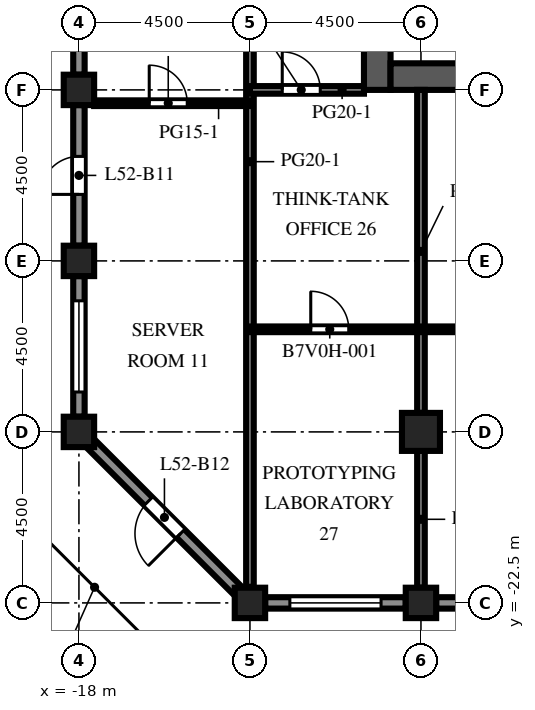
"""IFC4 building model, lengths in metres.
Left out: names, types, materials, properties, quantities, classifications, styles, units other than length and angle.
Written with IfcOpenShell. Run it as: python <this file> out.ifc"""

import sys

from ifc_helpers import new_model, si_unit, direction, frame, frame_2d, origin, origin_2d, place, context, subcontext, project, spatial, rectangle, extrude, element, fill, save


model = new_model("IFC4")
c1 = context("Model", 3, precision=1e-05, world=origin(), true_north=direction((0.0, 1.0)))
c2 = subcontext(c1, "Body", "Model", "MODEL_VIEW")
j1 = project(units=[si_unit("LENGTHUNIT", "METRE"), si_unit("PLANEANGLEUNIT", "RADIAN")], contexts=[c1])
p1 = place(None, origin())
s1 = spatial("IfcSite", under=j1, at=p1, CompositionType="ELEMENT")
p2 = place(p1, origin())
s2 = spatial("IfcBuilding", under=s1, at=p2, CompositionType="ELEMENT")
p3 = place(p2, frame((0.0, 0.0, 231.6)))
s3 = spatial("IfcBuildingStorey", under=s2, at=p3, CompositionType="ELEMENT", Elevation=231.6)
for number, where, z_axis, x_axis in (
    (1, (-18.0, -18.0, 0.0), (0.0, 0.0, 1.0), (1.0, 0.0, 0.0)),
    (2, (-18.0, -13.5, 0.0), (0.0, 0.0, 1.0), (1.0, 0.0, 0.0)),
    (3, (-18.0, -9.0, 0.0), (0.0, 0.0, 1.0), (1.0, 0.0, 0.0)),
    (4, (-13.5, -22.5, 0.0), (0.0, 0.0, 1.0), (1.0, 0.0, 0.0)),
    (5, (-9.0, -22.5, 0.0), (0.0, 0.0, 1.0), (1.0, 0.0, 0.0)),
):
    element("IfcColumn", number, at=place(p3, frame(where, z_axis=z_axis, x_axis=x_axis)), inside=s3, PredefinedType="COLUMN", context=c2, shape_type="SweptSolid", body=[
        extrude(rectangle(XDim=0.8, YDim=0.8, at=origin_2d()), origin(), (0.0, 0.0, 1.0), 4.1),
    ])
p4 = place(p3, frame((-9.0, -18.0, 0.0), z_axis=(0.0, 0.0, 1.0), x_axis=(1.0, 0.0, 0.0)))
e6 = element("IfcColumn", 6, at=p4, inside=s3, PredefinedType="COLUMN", context=c2, shape_type="SweptSolid", body=[
    extrude(rectangle(XDim=1.0, YDim=1.0, at=origin_2d()), origin(), (0.0, 0.0, 1.0), 4.1),
])
p5 = place(p3, frame((-10.15, -9.0, 0.0), z_axis=(0.0, 0.0, 1.0), x_axis=(0.0, 1.0, 0.0)))
e7 = element("IfcWall", 7, at=p5, inside=s3, PredefinedType="SHEAR", context=c2, shape_type="SweptSolid", body=[
    extrude(rectangle(XDim=27.5, YDim=0.7, at=frame_2d((13.75, 0.0))), origin(), (0.0, 0.0, 1.0), 4.1),
])
p6 = place(p5, frame((12.55, 0.0, 0.0)))
e8 = element("IfcOpeningElement", 8, at=p6, cuts=e7, PredefinedType="OPENING", context=c2, shape_type="SweptSolid", body=[
    extrude(rectangle(XDim=2.4, YDim=2.4, at=frame_2d((1.2, 1.2))), frame((0.0, 0.36, 0.0), z_axis=(0.0, -1.0, 0.0), x_axis=(1.0, 0.0, 0.0)), (0.0, 0.0, 1.0), 0.72),
])
p7 = place(p5, frame((6.825, 0.0, 0.0)))
e9 = element("IfcOpeningElement", 9, at=p7, cuts=e7, PredefinedType="OPENING", context=c2, shape_type="SweptSolid", body=[
    extrude(rectangle(XDim=1.2, YDim=2.1, at=frame_2d((0.6, 1.05))), frame((0.0, 0.36, 0.0), z_axis=(0.0, -1.0, 0.0), x_axis=(1.0, 0.0, 0.0)), (0.0, 0.0, 1.0), 0.72),
])
p8 = place(p5, frame((19.475, 0.0, 0.0)))
e10 = element("IfcOpeningElement", 10, at=p8, cuts=e7, PredefinedType="OPENING", context=c2, shape_type="SweptSolid", body=[
    extrude(rectangle(XDim=1.2, YDim=2.1, at=frame_2d((0.6, 1.05))), frame((0.0, 0.36, 0.0), z_axis=(0.0, -1.0, 0.0), x_axis=(1.0, 0.0, 0.0)), (0.0, 0.0, 1.0), 0.72),
])
p9 = place(p3, frame((-9.8, -8.65, 0.0), z_axis=(0.0, 0.0, 1.0), x_axis=(1.0, 0.0, 0.0)))
e11 = element("IfcWall", 11, at=p9, inside=s3, PredefinedType="SHEAR", context=c2, shape_type="SweptSolid", body=[
    extrude(rectangle(XDim=10.6, YDim=0.7, at=frame_2d((5.3, 0.0))), origin(), (0.0, 0.0, 1.0), 4.1),
])
p10 = place(p3, frame((-9.4, -22.5, 0.0), z_axis=(0.0, 0.0, 1.0), x_axis=(-1.0, 0.0, 0.0)))
e12 = element("IfcWall", 12, at=p10, inside=s3, PredefinedType="SOLIDWALL", context=c2, shape_type="SweptSolid", body=[
    extrude(rectangle(XDim=3.7, YDim=0.3, at=frame_2d((1.85, 0.0))), origin(), (0.0, 0.0, 1.0), 2.85),
])
p11 = place(p10, frame((0.65, 0.0, 0.8)))
e13 = element("IfcOpeningElement", 13, at=p11, cuts=e12, PredefinedType="OPENING", context=c2, shape_type="SweptSolid", body=[
    extrude(rectangle(XDim=2.4, YDim=1.7, at=frame_2d((1.2, 0.85))), frame((0.0, 0.16, 0.0), z_axis=(0.0, -1.0, 0.0), x_axis=(1.0, 0.0, 0.0)), (0.0, 0.0, 1.0), 0.32),
])
p12 = place(p3, frame((-4.9, -22.5, 0.0), z_axis=(0.0, 0.0, 1.0), x_axis=(-1.0, 0.0, 0.0)))
e14 = element("IfcWall", 14, at=p12, inside=s3, PredefinedType="SOLIDWALL", context=c2, shape_type="SweptSolid", body=[
    extrude(rectangle(XDim=3.7, YDim=0.3, at=frame_2d((1.85, 0.0))), origin(), (0.0, 0.0, 1.0), 2.85),
])
p13 = place(p12, frame((1.35, 0.0, 0.0)))
e15 = element("IfcOpeningElement", 15, at=p13, cuts=e14, PredefinedType="OPENING", context=c2, shape_type="SweptSolid", body=[
    extrude(rectangle(XDim=1.0, YDim=2.2, at=frame_2d((0.5, 1.1))), frame((0.0, 0.16, 0.0), z_axis=(0.0, -1.0, 0.0), x_axis=(1.0, 0.0, 0.0)), (0.0, 0.0, 1.0), 0.32),
])
p14 = place(p3, frame((-18.0, -8.6, 0.0), z_axis=(0.0, 0.0, 1.0), x_axis=(0.0, 1.0, 0.0)))
e16 = element("IfcWall", 16, at=p14, inside=s3, PredefinedType="SOLIDWALL", context=c2, shape_type="SweptSolid", body=[
    extrude(rectangle(XDim=3.7, YDim=0.3, at=frame_2d((1.85, 0.0))), origin(), (0.0, 0.0, 1.0), 2.85),
])
p15 = place(p14, frame((0.65, 0.0, 0.8)))
e17 = element("IfcOpeningElement", 17, at=p15, cuts=e16, PredefinedType="OPENING", context=c2, shape_type="SweptSolid", body=[
    extrude(rectangle(XDim=2.4, YDim=1.7, at=frame_2d((1.2, 0.85))), frame((0.0, 0.16, 0.0), z_axis=(0.0, -1.0, 0.0), x_axis=(1.0, 0.0, 0.0)), (0.0, 0.0, 1.0), 0.32),
])
p16 = place(p3, frame((-18.0, -13.1, 0.0), z_axis=(0.0, 0.0, 1.0), x_axis=(0.0, 1.0, 0.0)))
e18 = element("IfcWall", 18, at=p16, inside=s3, PredefinedType="SOLIDWALL", context=c2, shape_type="SweptSolid", body=[
    extrude(rectangle(XDim=3.7, YDim=0.3, at=frame_2d((1.85, 0.0))), origin(), (0.0, 0.0, 1.0), 2.85),
])
p17 = place(p16, frame((1.35, 0.0, 0.0)))
e19 = element("IfcOpeningElement", 19, at=p17, cuts=e18, PredefinedType="OPENING", context=c2, shape_type="SweptSolid", body=[
    extrude(rectangle(XDim=1.0, YDim=2.2, at=frame_2d((0.5, 1.1))), frame((0.0, 0.16, 0.0), z_axis=(0.0, -1.0, 0.0), x_axis=(1.0, 0.0, 0.0)), (0.0, 0.0, 1.0), 0.32),
])
p18 = place(p3, frame((-18.0, -17.6, 0.0), z_axis=(0.0, 0.0, 1.0), x_axis=(0.0, 1.0, 0.0)))
e20 = element("IfcWall", 20, at=p18, inside=s3, PredefinedType="SOLIDWALL", context=c2, shape_type="SweptSolid", body=[
    extrude(rectangle(XDim=3.7, YDim=0.3, at=frame_2d((1.85, 0.0))), origin(), (0.0, 0.0, 1.0), 2.85),
])
p19 = place(p18, frame((0.65, 0.0, 0.8)))
e21 = element("IfcOpeningElement", 21, at=p19, cuts=e20, PredefinedType="OPENING", context=c2, shape_type="SweptSolid", body=[
    extrude(rectangle(XDim=2.4, YDim=1.7, at=frame_2d((1.2, 0.85))), frame((0.0, 0.16, 0.0), z_axis=(0.0, -1.0, 0.0), x_axis=(1.0, 0.0, 0.0)), (0.0, 0.0, 1.0), 0.32),
])
p20 = place(p3, frame((-13.794, -22.206, 0.0), z_axis=(0.0, 0.0, 1.0), x_axis=(-0.707106781187, 0.707106781187, 0.0)))
e22 = element("IfcWall", 22, at=p20, inside=s3, PredefinedType="SOLIDWALL", context=c2, shape_type="SweptSolid", body=[
    extrude(rectangle(XDim=5.532, YDim=0.3, at=frame_2d((2.766, 0.0))), origin(), (0.0, 0.0, 1.0), 2.85),
])
p21 = place(p20, frame((2.166, 0.0, 0.0)))
e23 = element("IfcOpeningElement", 23, at=p21, cuts=e22, PredefinedType="OPENING", context=c2, shape_type="SweptSolid", body=[
    extrude(rectangle(XDim=1.2, YDim=2.2, at=frame_2d((0.6, 1.1))), frame((0.0, 0.16, 0.0), z_axis=(0.0, -1.0, 0.0), x_axis=(1.0, 0.0, 0.0)), (0.0, 0.0, 1.0), 0.32),
])
p22 = place(p3, frame((-13.5, -22.077, 0.0), z_axis=(0.0, 0.0, 1.0), x_axis=(0.0, 1.0, 0.0)))
e24 = element("IfcWall", 24, at=p22, inside=s3, PredefinedType="PARTITIONING", context=c2, shape_type="SweptSolid", body=[
    extrude(rectangle(XDim=25.327, YDim=0.2, at=frame_2d((12.664, 0.0))), origin(), (0.0, 0.0, 1.0), 3.65),
])
p23 = place(p22, frame((22.377, 0.0, 0.0)))
e25 = element("IfcOpeningElement", 25, at=p23, cuts=e24, PredefinedType="OPENING", context=c2, shape_type="SweptSolid", body=[
    extrude(rectangle(XDim=1.0, YDim=2.1, at=frame_2d((0.5, 1.05))), frame((0.0, 0.11, 0.0), z_axis=(0.0, -1.0, 0.0), x_axis=(1.0, 0.0, 0.0)), (0.0, 0.0, 1.0), 0.22),
])
p24 = place(p3, frame((-9.0, -22.1, 0.0), z_axis=(0.0, 0.0, 1.0), x_axis=(0.0, 1.0, 0.0)))
e26 = element("IfcWall", 26, at=p24, inside=s3, PredefinedType="PARTITIONING", context=c2, shape_type="SweptSolid", body=[
    extrude(rectangle(XDim=3.6, YDim=0.2, at=frame_2d((1.8, 0.0))), origin(), (0.0, 0.0, 1.0), 3.65),
])
p25 = place(p3, frame((-9.0, -17.5, 0.0), z_axis=(0.0, 0.0, 1.0), x_axis=(0.0, 1.0, 0.0)))
e27 = element("IfcWall", 27, at=p25, inside=s3, PredefinedType="PARTITIONING", context=c2, shape_type="SweptSolid", body=[
    extrude(rectangle(XDim=8.5, YDim=0.2, at=frame_2d((4.25, 0.0))), origin(), (0.0, 0.0, 1.0), 3.65),
])
p26 = place(p3, frame((21.0, -15.3, 0.0), z_axis=(0.0, 0.0, 1.0), x_axis=(-1.0, 0.0, 0.0)))
e28 = element("IfcWall", 28, at=p26, inside=s3, PredefinedType="PARTITIONING", context=c2, shape_type="SweptSolid", body=[
    extrude(rectangle(XDim=34.5, YDim=0.15, at=frame_2d((17.25, 0.0))), origin(), (0.0, 0.0, 1.0), 3.65),
])
p27 = place(p26, frame((31.9, 0.0, 0.0)))
e29 = element("IfcOpeningElement", 29, at=p27, cuts=e28, PredefinedType="OPENING", context=c2, shape_type="SweptSolid", body=[
    extrude(rectangle(XDim=1.0, YDim=2.1, at=frame_2d((0.5, 1.05))), frame((0.0, 0.085, 0.0), z_axis=(0.0, -1.0, 0.0), x_axis=(1.0, 0.0, 0.0)), (0.0, 0.0, 1.0), 0.17),
])
p28 = place(p26, frame((23.4, 0.0, 0.0)))
e30 = element("IfcOpeningElement", 30, at=p28, cuts=e28, PredefinedType="OPENING", context=c2, shape_type="SweptSolid", body=[
    extrude(rectangle(XDim=1.0, YDim=2.1, at=frame_2d((0.5, 1.05))), frame((0.0, 0.085, 0.0), z_axis=(0.0, -1.0, 0.0), x_axis=(1.0, 0.0, 0.0)), (0.0, 0.0, 1.0), 0.17),
])
p29 = place(p26, frame((11.65, 0.0, 0.0)))
e31 = element("IfcOpeningElement", 31, at=p29, cuts=e28, PredefinedType="OPENING", context=c2, shape_type="SweptSolid", body=[
    extrude(rectangle(XDim=1.0, YDim=2.1, at=frame_2d((0.5, 1.05))), frame((0.0, 0.085, 0.0), z_axis=(0.0, -1.0, 0.0), x_axis=(1.0, 0.0, 0.0)), (0.0, 0.0, 1.0), 0.17),
])
p30 = place(p26, frame((2.65, 0.0, 0.0)))
e32 = element("IfcOpeningElement", 32, at=p30, cuts=e28, PredefinedType="OPENING", context=c2, shape_type="SweptSolid", body=[
    extrude(rectangle(XDim=1.0, YDim=2.1, at=frame_2d((0.5, 1.05))), frame((0.0, 0.085, 0.0), z_axis=(0.0, -1.0, 0.0), x_axis=(1.0, 0.0, 0.0)), (0.0, 0.0, 1.0), 0.17),
])
p31 = place(p3, frame((-13.5, -9.35, 0.0), z_axis=(0.0, 0.0, 1.0), x_axis=(-1.0, 0.0, 0.0)))
e33 = element("IfcWall", 33, at=p31, inside=s3, PredefinedType="PARTITIONING", context=c2, shape_type="SweptSolid", body=[
    extrude(rectangle(XDim=4.1, YDim=0.15, at=frame_2d((2.05, 0.0))), origin(), (0.0, 0.0, 1.0), 3.65),
])
p32 = place(p31, frame((1.65, 0.0, 0.0)))
e34 = element("IfcOpeningElement", 34, at=p32, cuts=e33, PredefinedType="OPENING", context=c2, shape_type="SweptSolid", body=[
    extrude(rectangle(XDim=1.0, YDim=2.1, at=frame_2d((0.5, 1.05))), frame((0.0, 0.085, 0.0), z_axis=(0.0, -1.0, 0.0), x_axis=(1.0, 0.0, 0.0)), (0.0, 0.0, 1.0), 0.17),
])
p33 = place(p3, frame((-10.5, -9.0, 0.0), z_axis=(0.0, 0.0, 1.0), x_axis=(-1.0, 0.0, 0.0)))
e35 = element("IfcWall", 35, at=p33, inside=s3, PredefinedType="PARTITIONING", context=c2, shape_type="SweptSolid", body=[
    extrude(rectangle(XDim=3.0, YDim=0.2, at=frame_2d((1.5, 0.0))), origin(), (0.0, 0.0, 1.0), 3.65),
])
p34 = place(p33, frame((1.15, 0.0, 0.0)))
e36 = element("IfcOpeningElement", 36, at=p34, cuts=e35, PredefinedType="OPENING", context=c2, shape_type="SweptSolid", body=[
    extrude(rectangle(XDim=1.0, YDim=2.1, at=frame_2d((0.5, 1.05))), frame((0.0, 0.11, 0.0), z_axis=(0.0, -1.0, 0.0), x_axis=(1.0, 0.0, 0.0)), (0.0, 0.0, 1.0), 0.22),
])
p35 = place(p11, origin())
e37 = element("IfcWindow", 37, at=p35, inside=s3, PartitioningType="SINGLE_PANEL", PredefinedType="WINDOW", context=c2, shape_type="SweptSolid", body=[
    extrude(rectangle(XDim=2.4, YDim=1.7, at=frame_2d((1.2, 0.85))), frame((0.0, 0.03, 0.0), z_axis=(0.0, -1.0, 0.0), x_axis=(1.0, 0.0, 0.0)), (0.0, 0.0, 1.0), 0.06),
])
fill(e13, e37)
p36 = place(p17, origin())
e38 = element("IfcDoor", 38, at=p36, inside=s3, OperationType="SINGLE_SWING_LEFT", PredefinedType="DOOR", context=c2, shape_type="SweptSolid", body=[
    extrude(rectangle(XDim=1.0, YDim=2.2, at=frame_2d((0.5, 1.1))), frame((0.0, 0.025, 0.0), z_axis=(0.0, -1.0, 0.0), x_axis=(1.0, 0.0, 0.0)), (0.0, 0.0, 1.0), 0.05),
])
fill(e19, e38)
p37 = place(p19, origin())
e39 = element("IfcWindow", 39, at=p37, inside=s3, PartitioningType="SINGLE_PANEL", PredefinedType="WINDOW", context=c2, shape_type="SweptSolid", body=[
    extrude(rectangle(XDim=2.4, YDim=1.7, at=frame_2d((1.2, 0.85))), frame((0.0, 0.03, 0.0), z_axis=(0.0, -1.0, 0.0), x_axis=(1.0, 0.0, 0.0)), (0.0, 0.0, 1.0), 0.06),
])
fill(e21, e39)
p38 = place(p21, origin())
e40 = element("IfcDoor", 40, at=p38, inside=s3, OperationType="SINGLE_SWING_LEFT", PredefinedType="DOOR", context=c2, shape_type="SweptSolid", body=[
    extrude(rectangle(XDim=1.2, YDim=2.2, at=frame_2d((0.6, 1.1))), frame((0.0, 0.025, 0.0), z_axis=(0.0, -1.0, 0.0), x_axis=(1.0, 0.0, 0.0)), (0.0, 0.0, 1.0), 0.05),
])
fill(e23, e40)
p39 = place(p27, origin())
e41 = element("IfcDoor", 41, at=p39, inside=s3, OperationType="SINGLE_SWING_RIGHT", PredefinedType="DOOR", context=c2, shape_type="SweptSolid", body=[
    extrude(rectangle(XDim=1.0, YDim=2.1, at=frame_2d((0.5, 1.05))), frame((0.0, 0.025, 0.0), z_axis=(0.0, -1.0, 0.0), x_axis=(1.0, 0.0, 0.0)), (0.0, 0.0, 1.0), 0.05),
])
fill(e29, e41)
p40 = place(p32, origin())
e42 = element("IfcDoor", 42, at=p40, inside=s3, OperationType="SINGLE_SWING_RIGHT", PredefinedType="DOOR", context=c2, shape_type="SweptSolid", body=[
    extrude(rectangle(XDim=1.0, YDim=2.1, at=frame_2d((0.5, 1.05))), frame((0.0, 0.025, 0.0), z_axis=(0.0, -1.0, 0.0), x_axis=(1.0, 0.0, 0.0)), (0.0, 0.0, 1.0), 0.05),
])
fill(e34, e42)
p41 = place(p34, origin())
e43 = element("IfcDoor", 43, at=p41, inside=s3, OperationType="SINGLE_SWING_RIGHT", PredefinedType="DOOR", context=c2, shape_type="SweptSolid", body=[
    extrude(rectangle(XDim=1.0, YDim=2.1, at=frame_2d((0.5, 1.05))), frame((0.0, 0.025, 0.0), z_axis=(0.0, -1.0, 0.0), x_axis=(1.0, 0.0, 0.0)), (0.0, 0.0, 1.0), 0.05),
])
fill(e36, e43)
save(model, sys.argv[1])
